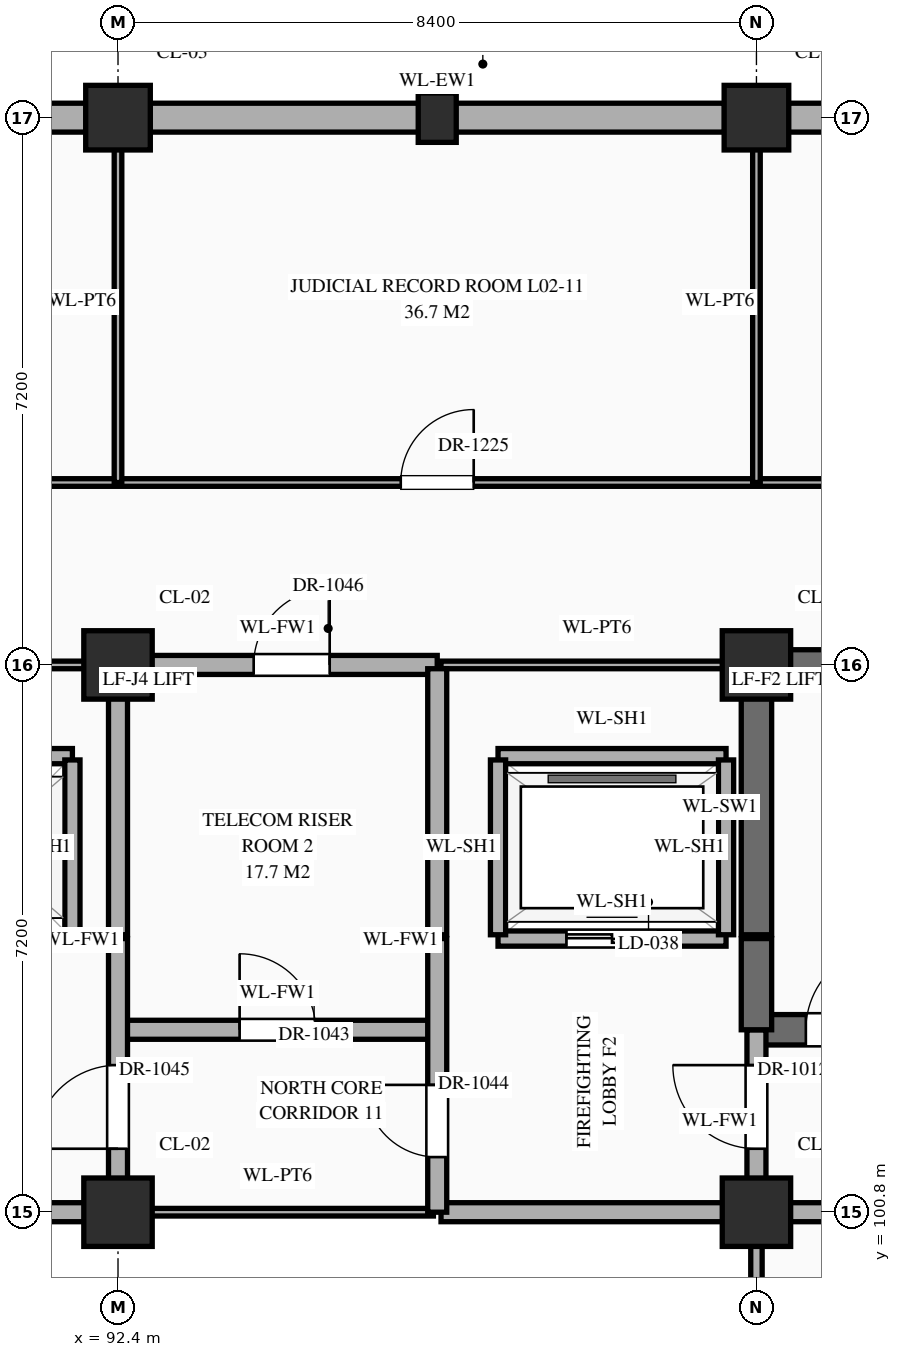
"""IFC4 building model, lengths in metres.
Left out: names, types, materials, properties, quantities, classifications, styles, units other than length and angle.
Written with IfcOpenShell. Run it as: python <this file> out.ifc"""

import sys

from ifc_helpers import new_model, si_unit, direction, frame, frame_2d, origin, origin_2d, place, context, subcontext, project, spatial, rectangle, extrude, element, fill, save


model = new_model("IFC4")
c1 = context("Model", 3, precision=1e-05, world=origin(), true_north=direction((0.0, 1.0)))
c2 = subcontext(c1, "Body", "Model", "MODEL_VIEW")
j1 = project(units=[si_unit("LENGTHUNIT", "METRE"), si_unit("PLANEANGLEUNIT", "RADIAN")], contexts=[c1])
p1 = place(None, origin())
s1 = spatial("IfcSite", under=j1, at=p1, CompositionType="ELEMENT")
p2 = place(p1, origin())
s2 = spatial("IfcBuilding", under=s1, at=p2, CompositionType="ELEMENT")
p3 = place(p2, frame((0.0, 0.0, 5.4)))
s3 = spatial("IfcBuildingStorey", under=s2, at=p3, CompositionType="ELEMENT", Elevation=5.4)
for number, where, z_axis, x_axis in (
    (1, (92.4, 100.8, 0.0), (0.0, 0.0, 1.0), (1.0, 0.0, 0.0)),
    (2, (92.4, 108.0, 0.0), (0.0, 0.0, 1.0), (1.0, 0.0, 0.0)),
):
    element("IfcColumn", number, at=place(p3, frame(where, z_axis=z_axis, x_axis=x_axis)), inside=s3, PredefinedType="COLUMN", context=c2, shape_type="SweptSolid", body=[
        extrude(rectangle(XDim=0.9, YDim=0.9, at=origin_2d()), origin(), (0.0, 0.0, 1.0), 5.4),
    ])
p4 = place(p3, frame((92.4, 115.2, 0.0), z_axis=(0.0, 0.0, 1.0), x_axis=(1.0, 0.0, 0.0)))
e3 = element("IfcColumn", 3, at=p4, inside=s3, PredefinedType="COLUMN", context=c2, shape_type="SweptSolid", body=[
    extrude(rectangle(XDim=0.85, YDim=0.85, at=origin_2d()), origin(), (0.0, 0.0, 1.0), 5.4),
])
for number, where, z_axis, x_axis in (
    (4, (100.8, 100.8, 0.0), (0.0, 0.0, 1.0), (1.0, 0.0, 0.0)),
    (5, (100.8, 108.0, 0.0), (0.0, 0.0, 1.0), (1.0, 0.0, 0.0)),
):
    element("IfcColumn", number, at=place(p3, frame(where, z_axis=z_axis, x_axis=x_axis)), inside=s3, PredefinedType="COLUMN", context=c2, shape_type="SweptSolid", body=[
        extrude(rectangle(XDim=0.9, YDim=0.9, at=origin_2d()), origin(), (0.0, 0.0, 1.0), 5.4),
    ])
p5 = place(p3, frame((100.8, 115.2, 0.0), z_axis=(0.0, 0.0, 1.0), x_axis=(1.0, 0.0, 0.0)))
e6 = element("IfcColumn", 6, at=p5, inside=s3, PredefinedType="COLUMN", context=c2, shape_type="SweptSolid", body=[
    extrude(rectangle(XDim=0.85, YDim=0.85, at=origin_2d()), origin(), (0.0, 0.0, 1.0), 5.4),
])
p6 = place(p3, frame((96.6, 115.2, 0.0), z_axis=(0.0, 0.0, 1.0), x_axis=(1.0, 0.0, 0.0)))
e7 = element("IfcColumn", 7, at=p6, inside=s3, PredefinedType="PILASTER", context=c2, shape_type="SweptSolid", body=[
    extrude(rectangle(XDim=0.5, YDim=0.65, at=origin_2d()), origin(), (0.0, 0.0, 1.0), 5.4),
])
p7 = place(p3, frame((84.42, 115.2, 0.0), z_axis=(0.0, 0.0, 1.0), x_axis=(1.0, 0.0, 0.0)))
e8 = element("IfcWall", 8, at=p7, inside=s3, PredefinedType="STANDARD", context=c2, shape_type="SweptSolid", body=[
    extrude(rectangle(XDim=7.56, YDim=0.38, at=frame_2d((3.78, 0.0))), origin(), (0.0, 0.0, 1.0), 4.47),
])
p8 = place(p3, frame((92.82, 115.2, 0.0), z_axis=(0.0, 0.0, 1.0), x_axis=(1.0, 0.0, 0.0)))
e9 = element("IfcWall", 9, at=p8, inside=s3, PredefinedType="STANDARD", context=c2, shape_type="SweptSolid", body=[
    extrude(rectangle(XDim=7.56, YDim=0.38, at=frame_2d((3.78, 0.0))), origin(), (0.0, 0.0, 1.0), 4.47),
])
p9 = place(p3, frame((101.22, 115.2, 0.0), z_axis=(0.0, 0.0, 1.0), x_axis=(1.0, 0.0, 0.0)))
e10 = element("IfcWall", 10, at=p9, inside=s3, PredefinedType="STANDARD", context=c2, shape_type="SweptSolid", body=[
    extrude(rectangle(XDim=7.56, YDim=0.38, at=frame_2d((3.78, 0.0))), origin(), (0.0, 0.0, 1.0), 4.47),
])
p10 = place(p3, frame((84.05, 100.8, 0.0), z_axis=(0.0, 0.0, 1.0), x_axis=(1.0, 0.0, 0.0)))
e11 = element("IfcWall", 11, at=p10, inside=s3, PredefinedType="STANDARD", context=c2, shape_type="SweptSolid", body=[
    extrude(rectangle(XDim=8.3, YDim=0.25, at=frame_2d((4.15, 0.0))), origin(), (0.0, 0.0, 1.0), 4.27),
])
p11 = place(p3, frame((92.45, 100.8, 0.0), z_axis=(0.0, 0.0, 1.0), x_axis=(1.0, 0.0, 0.0)))
e12 = element("IfcWall", 12, at=p11, inside=s3, PredefinedType="STANDARD", context=c2, shape_type="SweptSolid", body=[
    extrude(rectangle(XDim=4.1, YDim=0.1, at=frame_2d((2.05, 0.0))), origin(), (0.0, 0.0, 1.0), 4.27),
])
p12 = place(p3, frame((96.65, 100.8, 0.0), z_axis=(0.0, 0.0, 1.0), x_axis=(1.0, 0.0, 0.0)))
e13 = element("IfcWall", 13, at=p12, inside=s3, PredefinedType="STANDARD", context=c2, shape_type="SweptSolid", body=[
    extrude(rectangle(XDim=4.1, YDim=0.25, at=frame_2d((2.05, 0.0))), origin(), (0.0, 0.0, 1.0), 4.27),
])
p13 = place(p3, frame((100.8, 100.8, 0.0), z_axis=(0.0, 0.0, 1.0), x_axis=(1.0, 0.0, 0.0)))
e14 = element("IfcWall", 14, at=p13, inside=s3, PredefinedType="STANDARD", context=c2, shape_type="SweptSolid", body=[
    extrude(rectangle(XDim=8.4, YDim=0.25, at=frame_2d((4.2, 0.0))), origin(), (0.0, 0.0, 1.0), 4.27),
])
p14 = place(p13, frame((3.725, 0.0, 0.0)))
e15 = element("IfcOpeningElement", 15, at=p14, cuts=e14, PredefinedType="OPENING", context=c2, shape_type="SweptSolid", body=[
    extrude(rectangle(XDim=0.95, YDim=2.15, at=frame_2d((0.475, 1.075))), frame((0.0, 0.137, 0.0), z_axis=(0.0, -1.0, 0.0), x_axis=(1.0, 0.0, 0.0)), (0.0, 0.0, 1.0), 0.274),
])
p15 = place(p3, frame((92.4, 103.2, 0.0), z_axis=(0.0, 0.0, 1.0), x_axis=(1.0, 0.0, 0.0)))
e16 = element("IfcWall", 16, at=p15, inside=s3, PredefinedType="STANDARD", context=c2, shape_type="SweptSolid", body=[
    extrude(rectangle(XDim=4.2, YDim=0.25, at=frame_2d((2.1, 0.0))), origin(), (0.0, 0.0, 1.0), 5.12),
])
p16 = place(p15, frame((1.6, 0.0, 0.0)))
e17 = element("IfcOpeningElement", 17, at=p16, cuts=e16, PredefinedType="OPENING", context=c2, shape_type="SweptSolid", body=[
    extrude(rectangle(XDim=1.0, YDim=2.2, at=frame_2d((0.5, 1.1))), frame((0.0, 0.137, 0.0), z_axis=(0.0, -1.0, 0.0), x_axis=(1.0, 0.0, 0.0)), (0.0, 0.0, 1.0), 0.274),
])
p17 = place(p3, frame((100.8, 103.2, 0.0), z_axis=(0.0, 0.0, 1.0), x_axis=(1.0, 0.0, 0.0)))
e18 = element("IfcWall", 18, at=p17, inside=s3, PredefinedType="SHEAR", context=c2, shape_type="SweptSolid", body=[
    extrude(rectangle(XDim=8.4, YDim=0.4, at=frame_2d((4.2, 0.0))), origin(), (0.0, 0.0, 1.0), 5.12),
])
p18 = place(p17, frame((0.65, 0.0, 0.0)))
e19 = element("IfcOpeningElement", 19, at=p18, cuts=e18, PredefinedType="OPENING", context=c2, shape_type="SweptSolid", body=[
    extrude(rectangle(XDim=1.1, YDim=2.2, at=frame_2d((0.55, 1.1))), frame((0.0, 0.212, 0.0), z_axis=(0.0, -1.0, 0.0), x_axis=(1.0, 0.0, 0.0)), (0.0, 0.0, 1.0), 0.424),
])
p19 = place(p3, frame((89.4, 104.4, 0.0), z_axis=(0.0, 0.0, 1.0), x_axis=(1.0, 0.0, 0.0)))
e20 = element("IfcWall", 20, at=p19, inside=s3, PredefinedType="STANDARD", context=c2, shape_type="SweptSolid", body=[
    extrude(rectangle(XDim=2.4, YDim=0.2, at=frame_2d((1.2, 0.0))), origin(), (0.0, 0.0, 1.0), 5.12),
])
p20 = place(p19, frame((0.7, 0.0, 0.0)))
e21 = element("IfcOpeningElement", 21, at=p20, cuts=e20, PredefinedType="OPENING", context=c2, shape_type="SweptSolid", body=[
    extrude(rectangle(XDim=1.0, YDim=2.15, at=frame_2d((0.5, 1.075))), frame((0.0, 0.112, 0.0), z_axis=(0.0, -1.0, 0.0), x_axis=(1.0, 0.0, 0.0)), (0.0, 0.0, 1.0), 0.224),
])
p21 = place(p3, frame((97.4, 104.4, 0.0), z_axis=(0.0, 0.0, 1.0), x_axis=(1.0, 0.0, 0.0)))
e22 = element("IfcWall", 22, at=p21, inside=s3, PredefinedType="STANDARD", context=c2, shape_type="SweptSolid", body=[
    extrude(rectangle(XDim=3.0, YDim=0.2, at=frame_2d((1.5, 0.0))), origin(), (0.0, 0.0, 1.0), 5.12),
])
p22 = place(p21, frame((0.9, 0.0, 0.0)))
e23 = element("IfcOpeningElement", 23, at=p22, cuts=e22, PredefinedType="OPENING", context=c2, shape_type="SweptSolid", body=[
    extrude(rectangle(XDim=1.2, YDim=2.15, at=frame_2d((0.6, 1.075))), frame((0.0, 0.112, 0.0), z_axis=(0.0, -1.0, 0.0), x_axis=(1.0, 0.0, 0.0)), (0.0, 0.0, 1.0), 0.224),
])
p23 = place(p3, frame((89.4, 106.8, 0.0), z_axis=(0.0, 0.0, 1.0), x_axis=(1.0, 0.0, 0.0)))
e24 = element("IfcWall", 24, at=p23, inside=s3, PredefinedType="STANDARD", context=c2, shape_type="SweptSolid", body=[
    extrude(rectangle(XDim=2.4, YDim=0.2, at=frame_2d((1.2, 0.0))), origin(), (0.0, 0.0, 1.0), 5.12),
])
p24 = place(p3, frame((97.4, 106.8, 0.0), z_axis=(0.0, 0.0, 1.0), x_axis=(1.0, 0.0, 0.0)))
e25 = element("IfcWall", 25, at=p24, inside=s3, PredefinedType="STANDARD", context=c2, shape_type="SweptSolid", body=[
    extrude(rectangle(XDim=3.0, YDim=0.2, at=frame_2d((1.5, 0.0))), origin(), (0.0, 0.0, 1.0), 5.12),
])
p25 = place(p3, frame((86.2, 108.0, 0.0), z_axis=(0.0, 0.0, 1.0), x_axis=(1.0, 0.0, 0.0)))
e26 = element("IfcWall", 26, at=p25, inside=s3, PredefinedType="STANDARD", context=c2, shape_type="SweptSolid", body=[
    extrude(rectangle(XDim=6.15, YDim=0.1, at=frame_2d((3.075, 0.0))), origin(), (0.0, 0.0, 1.0), 4.27),
])
p26 = place(p3, frame((92.4, 108.0, 0.0), z_axis=(0.0, 0.0, 1.0), x_axis=(1.0, 0.0, 0.0)))
e27 = element("IfcWall", 27, at=p26, inside=s3, PredefinedType="STANDARD", context=c2, shape_type="SweptSolid", body=[
    extrude(rectangle(XDim=4.2, YDim=0.25, at=frame_2d((2.1, 0.0))), origin(), (0.0, 0.0, 1.0), 4.27),
])
p27 = place(p26, frame((1.785, 0.0, 0.0)))
e28 = element("IfcOpeningElement", 28, at=p27, cuts=e27, PredefinedType="OPENING", context=c2, shape_type="SweptSolid", body=[
    extrude(rectangle(XDim=1.0, YDim=2.2, at=frame_2d((0.5, 1.1))), frame((0.0, 0.137, 0.0), z_axis=(0.0, -1.0, 0.0), x_axis=(1.0, 0.0, 0.0)), (0.0, 0.0, 1.0), 0.274),
])
p28 = place(p3, frame((96.65, 108.0, 0.0), z_axis=(0.0, 0.0, 1.0), x_axis=(1.0, 0.0, 0.0)))
e29 = element("IfcWall", 29, at=p28, inside=s3, PredefinedType="STANDARD", context=c2, shape_type="SweptSolid", body=[
    extrude(rectangle(XDim=4.1, YDim=0.1, at=frame_2d((2.05, 0.0))), origin(), (0.0, 0.0, 1.0), 4.27),
])
p29 = place(p3, frame((100.8, 108.0, 0.0), z_axis=(0.0, 0.0, 1.0), x_axis=(1.0, 0.0, 0.0)))
e30 = element("IfcWall", 30, at=p29, inside=s3, PredefinedType="SHEAR", context=c2, shape_type="SweptSolid", body=[
    extrude(rectangle(XDim=8.4, YDim=0.4, at=frame_2d((4.2, 0.0))), origin(), (0.0, 0.0, 1.0), 5.12),
])
p30 = place(p3, frame((50.44, 110.4, 0.0), z_axis=(0.0, 0.0, 1.0), x_axis=(1.0, 0.0, 0.0)))
e31 = element("IfcWall", 31, at=p30, inside=s3, PredefinedType="STANDARD", context=c2, shape_type="SweptSolid", body=[
    extrude(rectangle(XDim=67.12, YDim=0.1, at=frame_2d((33.56, 0.0))), origin(), (0.0, 0.0, 1.0), 5.12),
])
p31 = place(p30, frame((3.65, 0.0, 0.0)))
e32 = element("IfcOpeningElement", 32, at=p31, cuts=e31, PredefinedType="OPENING", context=c2, shape_type="SweptSolid", body=[
    extrude(rectangle(XDim=1.06, YDim=2.4, at=frame_2d((0.53, 1.2))), frame((0.0, 0.062, 0.0), z_axis=(0.0, -1.0, 0.0), x_axis=(1.0, 0.0, 0.0)), (0.0, 0.0, 1.0), 0.124),
])
p32 = place(p30, frame((11.99, 0.0, 0.0)))
e33 = element("IfcOpeningElement", 33, at=p32, cuts=e31, PredefinedType="OPENING", context=c2, shape_type="SweptSolid", body=[
    extrude(rectangle(XDim=1.14, YDim=2.4, at=frame_2d((0.57, 1.2))), frame((0.0, 0.062, 0.0), z_axis=(0.0, -1.0, 0.0), x_axis=(1.0, 0.0, 0.0)), (0.0, 0.0, 1.0), 0.124),
])
p33 = place(p30, frame((20.51, 0.0, 0.0)))
e34 = element("IfcOpeningElement", 34, at=p33, cuts=e31, PredefinedType="OPENING", context=c2, shape_type="SweptSolid", body=[
    extrude(rectangle(XDim=0.9, YDim=2.15, at=frame_2d((0.45, 1.075))), frame((0.0, 0.062, 0.0), z_axis=(0.0, -1.0, 0.0), x_axis=(1.0, 0.0, 0.0)), (0.0, 0.0, 1.0), 0.124),
])
p34 = place(p30, frame((28.93, 0.0, 0.0)))
e35 = element("IfcOpeningElement", 35, at=p34, cuts=e31, PredefinedType="OPENING", context=c2, shape_type="SweptSolid", body=[
    extrude(rectangle(XDim=0.86, YDim=2.1, at=frame_2d((0.43, 1.05))), frame((0.0, 0.062, 0.0), z_axis=(0.0, -1.0, 0.0), x_axis=(1.0, 0.0, 0.0)), (0.0, 0.0, 1.0), 0.124),
])
p35 = place(p30, frame((37.3, 0.0, 0.0)))
e36 = element("IfcOpeningElement", 36, at=p35, cuts=e31, PredefinedType="OPENING", context=c2, shape_type="SweptSolid", body=[
    extrude(rectangle(XDim=0.92, YDim=2.15, at=frame_2d((0.46, 1.075))), frame((0.0, 0.062, 0.0), z_axis=(0.0, -1.0, 0.0), x_axis=(1.0, 0.0, 0.0)), (0.0, 0.0, 1.0), 0.124),
])
p36 = place(p30, frame((45.68, 0.0, 0.0)))
e37 = element("IfcOpeningElement", 37, at=p36, cuts=e31, PredefinedType="OPENING", context=c2, shape_type="SweptSolid", body=[
    extrude(rectangle(XDim=0.96, YDim=2.2, at=frame_2d((0.48, 1.1))), frame((0.0, 0.062, 0.0), z_axis=(0.0, -1.0, 0.0), x_axis=(1.0, 0.0, 0.0)), (0.0, 0.0, 1.0), 0.124),
])
p37 = place(p30, frame((54.06, 0.0, 0.0)))
e38 = element("IfcOpeningElement", 38, at=p37, cuts=e31, PredefinedType="OPENING", context=c2, shape_type="SweptSolid", body=[
    extrude(rectangle(XDim=1.0, YDim=2.25, at=frame_2d((0.5, 1.125))), frame((0.0, 0.062, 0.0), z_axis=(0.0, -1.0, 0.0), x_axis=(1.0, 0.0, 0.0)), (0.0, 0.0, 1.0), 0.124),
])
p38 = place(p30, frame((62.42, 0.0, 0.0)))
e39 = element("IfcOpeningElement", 39, at=p38, cuts=e31, PredefinedType="OPENING", context=c2, shape_type="SweptSolid", body=[
    extrude(rectangle(XDim=1.04, YDim=2.2, at=frame_2d((0.52, 1.1))), frame((0.0, 0.062, 0.0), z_axis=(0.0, -1.0, 0.0), x_axis=(1.0, 0.0, 0.0)), (0.0, 0.0, 1.0), 0.124),
])
p39 = place(p3, frame((91.8, 104.45, 0.0), z_axis=(0.0, 0.0, 1.0), x_axis=(0.0, 1.0, 0.0)))
e40 = element("IfcWall", 40, at=p39, inside=s3, PredefinedType="STANDARD", context=c2, shape_type="SweptSolid", body=[
    extrude(rectangle(XDim=2.3, YDim=0.2, at=frame_2d((1.15, 0.0))), origin(), (0.0, 0.0, 1.0), 5.12),
])
p40 = place(p3, frame((92.4, 100.8, 0.0), z_axis=(0.0, 0.0, 1.0), x_axis=(0.0, 1.0, 0.0)))
e41 = element("IfcWall", 41, at=p40, inside=s3, PredefinedType="STANDARD", context=c2, shape_type="SweptSolid", body=[
    extrude(rectangle(XDim=3.6, YDim=0.25, at=frame_2d((1.8, 0.0))), origin(), (0.0, 0.0, 1.0), 4.37),
])
p41 = place(p40, frame((0.835, 0.0, 0.0)))
e42 = element("IfcOpeningElement", 42, at=p41, cuts=e41, PredefinedType="OPENING", context=c2, shape_type="SweptSolid", body=[
    extrude(rectangle(XDim=1.1, YDim=2.2, at=frame_2d((0.55, 1.1))), frame((0.0, 0.137, 0.0), z_axis=(0.0, -1.0, 0.0), x_axis=(1.0, 0.0, 0.0)), (0.0, 0.0, 1.0), 0.274),
])
p42 = place(p3, frame((92.4, 104.45, 0.0), z_axis=(0.0, 0.0, 1.0), x_axis=(0.0, 1.0, 0.0)))
e43 = element("IfcWall", 43, at=p42, inside=s3, PredefinedType="STANDARD", context=c2, shape_type="SweptSolid", body=[
    extrude(rectangle(XDim=3.5, YDim=0.25, at=frame_2d((1.75, 0.0))), origin(), (0.0, 0.0, 1.0), 4.37),
])
p43 = place(p3, frame((92.4, 110.4, 0.0), z_axis=(0.0, 0.0, 1.0), x_axis=(0.0, 1.0, 0.0)))
e44 = element("IfcWall", 44, at=p43, inside=s3, PredefinedType="STANDARD", context=c2, shape_type="SweptSolid", body=[
    extrude(rectangle(XDim=4.76, YDim=0.1, at=frame_2d((2.38, 0.0))), origin(), (0.0, 0.0, 1.0), 4.37),
])
p44 = place(p3, frame((96.6, 100.8, 0.0), z_axis=(0.0, 0.0, 1.0), x_axis=(0.0, 1.0, 0.0)))
e45 = element("IfcWall", 45, at=p44, inside=s3, PredefinedType="STANDARD", context=c2, shape_type="SweptSolid", body=[
    extrude(rectangle(XDim=3.6, YDim=0.25, at=frame_2d((1.8, 0.0))), origin(), (0.0, 0.0, 1.0), 4.72),
])
p45 = place(p44, frame((0.725, 0.0, 0.0)))
e46 = element("IfcOpeningElement", 46, at=p45, cuts=e45, PredefinedType="OPENING", context=c2, shape_type="SweptSolid", body=[
    extrude(rectangle(XDim=0.95, YDim=2.15, at=frame_2d((0.475, 1.075))), frame((0.0, 0.137, 0.0), z_axis=(0.0, -1.0, 0.0), x_axis=(1.0, 0.0, 0.0)), (0.0, 0.0, 1.0), 0.274),
])
p46 = place(p3, frame((96.6, 104.45, 0.0), z_axis=(0.0, 0.0, 1.0), x_axis=(0.0, 1.0, 0.0)))
e47 = element("IfcWall", 47, at=p46, inside=s3, PredefinedType="STANDARD", context=c2, shape_type="SweptSolid", body=[
    extrude(rectangle(XDim=3.5, YDim=0.25, at=frame_2d((1.75, 0.0))), origin(), (0.0, 0.0, 1.0), 4.72),
])
for number, where, z_axis, x_axis in (
    (48, (97.4, 104.45, 0.0), (0.0, 0.0, 1.0), (0.0, 1.0, 0.0)),
    (49, (100.4, 104.45, 0.0), (0.0, 0.0, 1.0), (0.0, 1.0, 0.0)),
):
    element("IfcWall", number, at=place(p3, frame(where, z_axis=z_axis, x_axis=x_axis)), inside=s3, PredefinedType="STANDARD", context=c2, shape_type="SweptSolid", body=[
        extrude(rectangle(XDim=2.3, YDim=0.2, at=frame_2d((1.15, 0.0))), origin(), (0.0, 0.0, 1.0), 5.12),
    ])
p47 = place(p3, frame((100.8, 96.05, 0.0), z_axis=(0.0, 0.0, 1.0), x_axis=(0.0, 1.0, 0.0)))
e50 = element("IfcWall", 50, at=p47, inside=s3, PredefinedType="STANDARD", context=c2, shape_type="SweptSolid", body=[
    extrude(rectangle(XDim=4.7, YDim=0.15, at=frame_2d((2.35, 0.0))), origin(), (0.0, 0.0, 1.0), 4.37),
])
p48 = place(p3, frame((100.8, 100.8, 0.0), z_axis=(0.0, 0.0, 1.0), x_axis=(0.0, 1.0, 0.0)))
e51 = element("IfcWall", 51, at=p48, inside=s3, PredefinedType="STANDARD", context=c2, shape_type="SweptSolid", body=[
    extrude(rectangle(XDim=2.4, YDim=0.25, at=frame_2d((1.2, 0.0))), origin(), (0.0, 0.0, 1.0), 4.37),
])
p49 = place(p48, frame((0.835, 0.0, 0.0)))
e52 = element("IfcOpeningElement", 52, at=p49, cuts=e51, PredefinedType="OPENING", context=c2, shape_type="SweptSolid", body=[
    extrude(rectangle(XDim=1.1, YDim=2.2, at=frame_2d((0.55, 1.1))), frame((0.0, 0.137, 0.0), z_axis=(0.0, -1.0, 0.0), x_axis=(1.0, 0.0, 0.0)), (0.0, 0.0, 1.0), 0.274),
])
p50 = place(p3, frame((100.8, 103.2, 0.0), z_axis=(0.0, 0.0, 1.0), x_axis=(0.0, 1.0, 0.0)))
e53 = element("IfcWall", 53, at=p50, inside=s3, PredefinedType="SHEAR", context=c2, shape_type="SweptSolid", body=[
    extrude(rectangle(XDim=1.2, YDim=0.4, at=frame_2d((0.6, 0.0))), origin(), (0.0, 0.0, 1.0), 5.12),
])
p51 = place(p3, frame((100.8, 104.45, 0.0), z_axis=(0.0, 0.0, 1.0), x_axis=(0.0, 1.0, 0.0)))
e54 = element("IfcWall", 54, at=p51, inside=s3, PredefinedType="SHEAR", context=c2, shape_type="SweptSolid", body=[
    extrude(rectangle(XDim=3.5, YDim=0.4, at=frame_2d((1.75, 0.0))), origin(), (0.0, 0.0, 1.0), 5.12),
])
p52 = place(p3, frame((100.8, 110.4, 0.0), z_axis=(0.0, 0.0, 1.0), x_axis=(0.0, 1.0, 0.0)))
e55 = element("IfcWall", 55, at=p52, inside=s3, PredefinedType="STANDARD", context=c2, shape_type="SweptSolid", body=[
    extrude(rectangle(XDim=4.76, YDim=0.1, at=frame_2d((2.38, 0.0))), origin(), (0.0, 0.0, 1.0), 4.37),
])
p53 = place(p22, origin())
e56 = element("IfcDoor", 56, at=p53, inside=s3, OperationType="DOUBLE_DOOR_SLIDING", PredefinedType="DOOR", context=c2, shape_type="SweptSolid", body=[
    extrude(rectangle(XDim=1.2, YDim=2.15, at=frame_2d((0.6, 1.075))), frame((0.0, 0.025, 0.0), z_axis=(0.0, -1.0, 0.0), x_axis=(1.0, 0.0, 0.0)), (0.0, 0.0, 1.0), 0.05),
])
fill(e23, e56)
p54 = place(p18, origin())
e57 = element("IfcDoor", 57, at=p54, inside=s3, OperationType="SINGLE_SWING_RIGHT", PredefinedType="DOOR", context=c2, shape_type="SweptSolid", body=[
    extrude(rectangle(XDim=1.1, YDim=2.2, at=frame_2d((0.55, 1.1))), frame((0.0, 0.025, 0.0), z_axis=(0.0, -1.0, 0.0), x_axis=(1.0, 0.0, 0.0)), (0.0, 0.0, 1.0), 0.05),
])
fill(e19, e57)
p55 = place(p49, origin())
e58 = element("IfcDoor", 58, at=p55, inside=s3, OperationType="SINGLE_SWING_RIGHT", PredefinedType="DOOR", context=c2, shape_type="SweptSolid", body=[
    extrude(rectangle(XDim=1.1, YDim=2.2, at=frame_2d((0.55, 1.1))), frame((0.0, 0.025, 0.0), z_axis=(0.0, -1.0, 0.0), x_axis=(1.0, 0.0, 0.0)), (0.0, 0.0, 1.0), 0.05),
])
fill(e52, e58)
p56 = place(p16, origin())
e59 = element("IfcDoor", 59, at=p56, inside=s3, OperationType="SINGLE_SWING_LEFT", PredefinedType="DOOR", context=c2, shape_type="SweptSolid", body=[
    extrude(rectangle(XDim=1.0, YDim=2.2, at=frame_2d((0.5, 1.1))), frame((0.0, 0.025, 0.0), z_axis=(0.0, -1.0, 0.0), x_axis=(1.0, 0.0, 0.0)), (0.0, 0.0, 1.0), 0.05),
])
fill(e17, e59)
p57 = place(p45, origin())
e60 = element("IfcDoor", 60, at=p57, inside=s3, OperationType="SINGLE_SWING_RIGHT", PredefinedType="DOOR", context=c2, shape_type="SweptSolid", body=[
    extrude(rectangle(XDim=0.95, YDim=2.15, at=frame_2d((0.475, 1.075))), frame((0.0, 0.025, 0.0), z_axis=(0.0, -1.0, 0.0), x_axis=(1.0, 0.0, 0.0)), (0.0, 0.0, 1.0), 0.05),
])
fill(e46, e60)
p58 = place(p41, origin())
e61 = element("IfcDoor", 61, at=p58, inside=s3, OperationType="SINGLE_SWING_LEFT", PredefinedType="DOOR", context=c2, shape_type="SweptSolid", body=[
    extrude(rectangle(XDim=1.1, YDim=2.2, at=frame_2d((0.55, 1.1))), frame((0.0, 0.025, 0.0), z_axis=(0.0, -1.0, 0.0), x_axis=(1.0, 0.0, 0.0)), (0.0, 0.0, 1.0), 0.05),
])
fill(e42, e61)
p59 = place(p27, origin())
e62 = element("IfcDoor", 62, at=p59, inside=s3, OperationType="SINGLE_SWING_RIGHT", PredefinedType="DOOR", context=c2, shape_type="SweptSolid", body=[
    extrude(rectangle(XDim=1.0, YDim=2.2, at=frame_2d((0.5, 1.1))), frame((0.0, 0.025, 0.0), z_axis=(0.0, -1.0, 0.0), x_axis=(1.0, 0.0, 0.0)), (0.0, 0.0, 1.0), 0.05),
])
fill(e28, e62)
p60 = place(p36, origin())
e63 = element("IfcDoor", 63, at=p60, inside=s3, OperationType="SINGLE_SWING_RIGHT", PredefinedType="DOOR", context=c2, shape_type="SweptSolid", body=[
    extrude(rectangle(XDim=0.96, YDim=2.2, at=frame_2d((0.48, 1.1))), frame((0.0, 0.025, 0.0), z_axis=(0.0, -1.0, 0.0), x_axis=(1.0, 0.0, 0.0)), (0.0, 0.0, 1.0), 0.05),
])
fill(e37, e63)
save(model, sys.argv[1])
